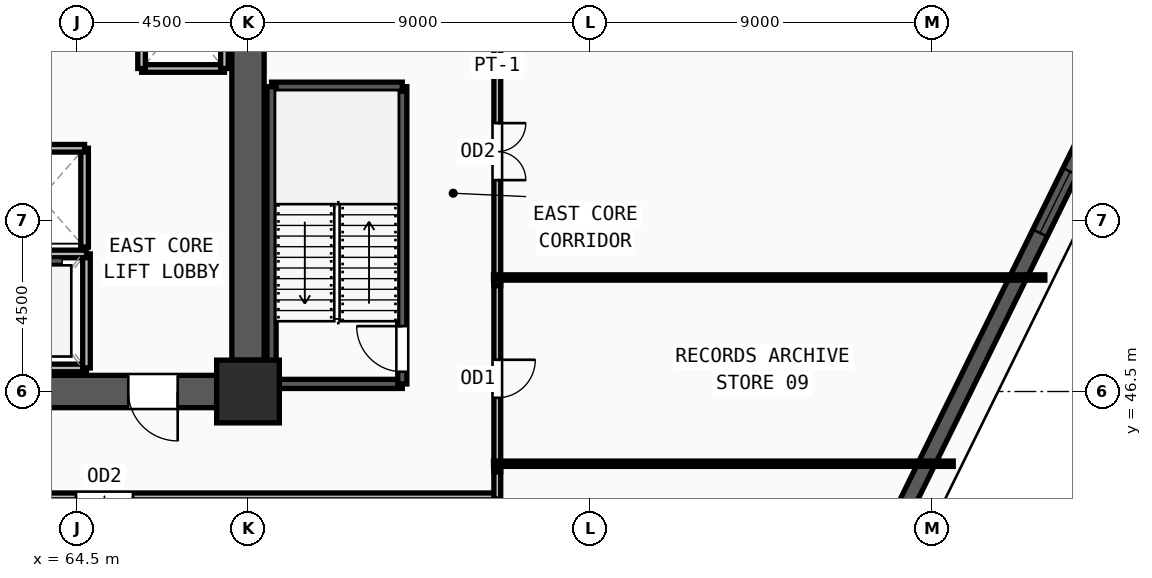
"""IFC4 building model, lengths in metres.
Left out: names, types, materials, properties, quantities, classifications, styles, units other than length and angle.
Written with IfcOpenShell. Run it as: python <this file> out.ifc"""

import sys

from ifc_helpers import new_model, si_unit, direction, frame, frame_2d, origin, origin_2d, place, context, subcontext, project, spatial, rectangle, extrude, source, transform, mapped, element, fill, save


model = new_model("IFC4")
c1 = context("Model", 3, precision=1e-05, world=origin(), true_north=direction((0.0, 1.0)))
c2 = subcontext(c1, "Body", "Model", "MODEL_VIEW")
j1 = project(units=[si_unit("LENGTHUNIT", "METRE"), si_unit("PLANEANGLEUNIT", "RADIAN")], contexts=[c1])
p1 = place(None, origin())
s1 = spatial("IfcSite", under=j1, at=p1, CompositionType="ELEMENT")
p2 = place(p1, origin())
s2 = spatial("IfcBuilding", under=s1, at=p2, CompositionType="ELEMENT")
p3 = place(p2, frame((0.0, 0.0, 39.75)))
s3 = spatial("IfcBuildingStorey", under=s2, at=p3, CompositionType="ELEMENT", Elevation=39.75)
m1 = source(origin(), c2, "Body", "SweptSolid", [
    extrude(rectangle(XDim=1.65, YDim=1.65, at=origin_2d()), origin(), (0.0, 0.0, 1.0), 3.75),
])
p4 = place(p3, frame((69.0, 46.5, 0.0), z_axis=(0.0, 0.0, 1.0), x_axis=(1.0, 0.0, 0.0)))
e1 = element("IfcColumn", 1, at=p4, inside=s3, PredefinedType="COLUMN", context=c2, shape_type="MappedRepresentation", body=[
    mapped(m1, transform((0.0, 0.0, 0.0), x_axis=(1.0, 0.0, 0.0), y_axis=(0.0, 1.0, 0.0), z_axis=(0.0, 0.0, 1.0), scale=1.0)),
])
p5 = place(p3, frame((86.172, 43.21, 0.0), z_axis=(0.0, 0.0, 1.0), x_axis=(0.441367208162, 0.897326577985, 0.0)))
e2 = element("IfcWall", 2, at=p5, inside=s3, PredefinedType="SOLIDWALL", context=c2, shape_type="SweptSolid", body=[
    extrude(rectangle(XDim=28.058, YDim=0.42, at=frame_2d((14.029, 0.0))), origin(), (0.0, 0.0, 1.0), 3.57),
])
m2 = source(origin(), c2, "Body", "SweptSolid", [
    extrude(rectangle(XDim=1.8, YDim=1.95, at=frame_2d((0.9, 0.975))), frame((0.0, 0.22, 0.0), z_axis=(0.0, -1.0, 0.0), x_axis=(1.0, 0.0, 0.0)), (0.0, 0.0, 1.0), 0.44),
])
p6 = place(p5, frame((8.314, 0.0, 0.55)))
e3 = element("IfcOpeningElement", 3, at=p6, cuts=e2, PredefinedType="OPENING", context=c2, shape_type="MappedRepresentation", body=[
    mapped(m2, transform((0.0, 0.0, 0.0), x_axis=(1.0, 0.0, 0.0), y_axis=(0.0, 1.0, 0.0), z_axis=(0.0, 0.0, 1.0), scale=1.0)),
])
p7 = place(p5, frame((13.129, 0.0, 0.55)))
e4 = element("IfcOpeningElement", 4, at=p7, cuts=e2, PredefinedType="OPENING", context=c2, shape_type="MappedRepresentation", body=[
    mapped(m2, transform((0.0, 0.0, 0.0), x_axis=(1.0, 0.0, 0.0), y_axis=(0.0, 1.0, 0.0), z_axis=(0.0, 0.0, 1.0), scale=1.0)),
])
p8 = place(p5, frame((20.143, 0.0, 0.55)))
e5 = element("IfcOpeningElement", 5, at=p8, cuts=e2, PredefinedType="OPENING", context=c2, shape_type="MappedRepresentation", body=[
    mapped(m2, transform((0.0, 0.0, 0.0), x_axis=(1.0, 0.0, 0.0), y_axis=(0.0, 1.0, 0.0), z_axis=(0.0, 0.0, 1.0), scale=1.0)),
])
p9 = place(p3, frame((69.0, 60.675, 0.0), z_axis=(0.0, 0.0, 1.0), x_axis=(0.0, -1.0, 0.0)))
e6 = element("IfcWall", 6, at=p9, inside=s3, PredefinedType="SHEAR", context=c2, shape_type="SweptSolid", body=[
    extrude(rectangle(XDim=13.35, YDim=0.85, at=frame_2d((6.675, 0.0))), origin(), (0.0, 0.0, 1.0), 3.57),
])
m3 = source(origin(), c2, "Body", "SweptSolid", [
    extrude(rectangle(XDim=1.2, YDim=2.2, at=frame_2d((0.6, 1.1))), frame((0.0, 0.435, 0.0), z_axis=(0.0, -1.0, 0.0), x_axis=(1.0, 0.0, 0.0)), (0.0, 0.0, 1.0), 0.87),
])
p10 = place(p9, frame((1.125, 0.0, 0.0)))
e7 = element("IfcOpeningElement", 7, at=p10, cuts=e6, PredefinedType="OPENING", context=c2, shape_type="MappedRepresentation", body=[
    mapped(m3, transform((0.0, 0.0, 0.0), x_axis=(1.0, 0.0, 0.0), y_axis=(0.0, 1.0, 0.0), z_axis=(0.0, 0.0, 1.0), scale=1.0)),
])
p11 = place(p3, frame((68.175, 46.5, 0.0), z_axis=(0.0, 0.0, 1.0), x_axis=(-1.0, 0.0, 0.0)))
e8 = element("IfcWall", 8, at=p11, inside=s3, PredefinedType="SHEAR", context=c2, shape_type="SweptSolid", body=[
    extrude(rectangle(XDim=7.35, YDim=0.85, at=frame_2d((3.675, 0.0))), origin(), (0.0, 0.0, 1.0), 3.57),
])
m4 = source(origin(), c2, "Body", "SweptSolid", [
    extrude(rectangle(XDim=1.3, YDim=2.2, at=frame_2d((0.65, 1.1))), frame((0.0, 0.435, 0.0), z_axis=(0.0, -1.0, 0.0), x_axis=(1.0, 0.0, 0.0)), (0.0, 0.0, 1.0), 0.87),
])
p12 = place(p11, frame((1.025, 0.0, 0.0)))
e9 = element("IfcOpeningElement", 9, at=p12, cuts=e8, PredefinedType="OPENING", context=c2, shape_type="MappedRepresentation", body=[
    mapped(m4, transform((0.0, 0.0, 0.0), x_axis=(1.0, 0.0, 0.0), y_axis=(0.0, 1.0, 0.0), z_axis=(0.0, 0.0, 1.0), scale=1.0)),
])
p13 = place(p3, frame((69.62, 46.7, 0.0), z_axis=(0.0, 0.0, 1.0), x_axis=(1.0, 0.0, 0.0)))
e10 = element("IfcWall", 10, at=p13, inside=s3, PredefinedType="SOLIDWALL", context=c2, shape_type="SweptSolid", body=[
    extrude(rectangle(XDim=3.44, YDim=0.24, at=frame_2d((1.72, 0.0))), origin(), (0.0, 0.0, 1.0), 3.57),
])
p14 = place(p3, frame((73.06, 46.7, 0.0), z_axis=(0.0, 0.0, 1.0), x_axis=(0.0, 1.0, 0.0)))
e11 = element("IfcWall", 11, at=p14, inside=s3, PredefinedType="SOLIDWALL", context=c2, shape_type="SweptSolid", body=[
    extrude(rectangle(XDim=7.82, YDim=0.24, at=frame_2d((3.91, 0.0))), origin(), (0.0, 0.0, 1.0), 3.57),
])
m5 = source(origin(), c2, "Body", "SweptSolid", [
    extrude(rectangle(XDim=1.2, YDim=2.2, at=frame_2d((0.6, 1.1))), frame((0.0, 0.13, 0.0), z_axis=(0.0, -1.0, 0.0), x_axis=(1.0, 0.0, 0.0)), (0.0, 0.0, 1.0), 0.26),
])
p15 = place(p14, frame((0.32, 0.0, 0.0)))
e12 = element("IfcOpeningElement", 12, at=p15, cuts=e11, PredefinedType="OPENING", context=c2, shape_type="MappedRepresentation", body=[
    mapped(m5, transform((0.0, 0.0, 0.0), x_axis=(1.0, 0.0, 0.0), y_axis=(0.0, 1.0, 0.0), z_axis=(0.0, 0.0, 1.0), scale=1.0)),
])
p16 = place(p3, frame((73.06, 54.52, 0.0), z_axis=(0.0, 0.0, 1.0), x_axis=(-1.0, 0.0, 0.0)))
e13 = element("IfcWall", 13, at=p16, inside=s3, PredefinedType="SOLIDWALL", context=c2, shape_type="SweptSolid", body=[
    extrude(rectangle(XDim=3.44, YDim=0.24, at=frame_2d((1.72, 0.0))), origin(), (0.0, 0.0, 1.0), 3.57),
])
p17 = place(p3, frame((69.62, 54.52, 0.0), z_axis=(0.0, 0.0, 1.0), x_axis=(0.0, -1.0, 0.0)))
e14 = element("IfcWall", 14, at=p17, inside=s3, PredefinedType="SOLIDWALL", context=c2, shape_type="SweptSolid", body=[
    extrude(rectangle(XDim=7.82, YDim=0.24, at=frame_2d((3.91, 0.0))), origin(), (0.0, 0.0, 1.0), 3.57),
])
p18 = place(p3, frame((62.35, 47.12, 0.0), z_axis=(0.0, 0.0, 1.0), x_axis=(1.0, 0.0, 0.0)))
e15 = element("IfcWall", 15, at=p18, inside=s3, PredefinedType="SOLIDWALL", context=c2, shape_type="SweptSolid", body=[
    extrude(rectangle(XDim=2.4, YDim=0.2, at=frame_2d((1.2, 0.0))), origin(), (0.0, 0.0, 1.0), 3.57),
])
p19 = place(p3, frame((64.75, 47.12, 0.0), z_axis=(0.0, 0.0, 1.0), x_axis=(0.0, 1.0, 0.0)))
e16 = element("IfcWall", 16, at=p19, inside=s3, PredefinedType="SOLIDWALL", context=c2, shape_type="SweptSolid", body=[
    extrude(rectangle(XDim=3.0, YDim=0.2, at=frame_2d((1.5, 0.0))), origin(), (0.0, 0.0, 1.0), 3.57),
])
p20 = place(p3, frame((64.75, 50.12, 0.0), z_axis=(0.0, 0.0, 1.0), x_axis=(-1.0, 0.0, 0.0)))
e17 = element("IfcWall", 17, at=p20, inside=s3, PredefinedType="SOLIDWALL", context=c2, shape_type="SweptSolid", body=[
    extrude(rectangle(XDim=2.4, YDim=0.2, at=frame_2d((1.2, 0.0))), origin(), (0.0, 0.0, 1.0), 3.57),
])
p21 = place(p3, frame((66.2, 55.0, 0.0), z_axis=(0.0, 0.0, 1.0), x_axis=(1.0, 0.0, 0.0)))
e18 = element("IfcWall", 18, at=p21, inside=s3, PredefinedType="SOLIDWALL", context=c2, shape_type="SweptSolid", body=[
    extrude(rectangle(XDim=2.18, YDim=0.2, at=frame_2d((1.09, 0.0))), origin(), (0.0, 0.0, 1.0), 3.57),
])
for number, where, z_axis, x_axis in (
    (19, (68.38, 55.0, 0.0), (0.0, 0.0, 1.0), (0.0, 1.0, 0.0)),
    (20, (66.2, 57.75, 0.0), (0.0, 0.0, 1.0), (0.0, -1.0, 0.0)),
):
    element("IfcWall", number, at=place(p3, frame(where, z_axis=z_axis, x_axis=x_axis)), inside=s3, PredefinedType="SOLIDWALL", context=c2, shape_type="SweptSolid", body=[
        extrude(rectangle(XDim=2.75, YDim=0.2, at=frame_2d((1.375, 0.0))), origin(), (0.0, 0.0, 1.0), 3.57),
    ])
p22 = place(p3, frame((64.7, 50.3, 0.0), z_axis=(0.0, 0.0, 1.0), x_axis=(0.0, 1.0, 0.0)))
e21 = element("IfcWall", 21, at=p22, inside=s3, PredefinedType="SOLIDWALL", context=c2, shape_type="SweptSolid", body=[
    extrude(rectangle(XDim=2.6, YDim=0.2, at=frame_2d((1.3, 0.0))), origin(), (0.0, 0.0, 1.0), 3.57),
])
p23 = place(p3, frame((64.7, 52.9, 0.0), z_axis=(0.0, 0.0, 1.0), x_axis=(-1.0, 0.0, 0.0)))
e22 = element("IfcWall", 22, at=p23, inside=s3, PredefinedType="SOLIDWALL", context=c2, shape_type="SweptSolid", body=[
    extrude(rectangle(XDim=2.3, YDim=0.2, at=frame_2d((1.15, 0.0))), origin(), (0.0, 0.0, 1.0), 3.57),
])
p24 = place(p3, frame((75.56, 56.34, 0.0), z_axis=(0.0, 0.0, 1.0), x_axis=(0.0, -1.0, 0.0)))
e23 = element("IfcWall", 23, at=p24, inside=s3, PredefinedType="PARTITIONING", context=c2, shape_type="SweptSolid", body=[
    extrude(rectangle(XDim=7.055, YDim=0.18, at=frame_2d((3.528, 0.0))), origin(), (0.0, 0.0, 1.0), 3.57),
])
m6 = source(origin(), c2, "Body", "SweptSolid", [
    extrude(rectangle(XDim=1.5, YDim=2.2, at=frame_2d((0.75, 1.1))), frame((0.0, 0.1, 0.0), z_axis=(0.0, -1.0, 0.0), x_axis=(1.0, 0.0, 0.0)), (0.0, 0.0, 1.0), 0.2),
])
p25 = place(p24, frame((2.778, 0.0, 0.0)))
e24 = element("IfcOpeningElement", 24, at=p25, cuts=e23, PredefinedType="OPENING", context=c2, shape_type="MappedRepresentation", body=[
    mapped(m6, transform((0.0, 0.0, 0.0), x_axis=(1.0, 0.0, 0.0), y_axis=(0.0, 1.0, 0.0), z_axis=(0.0, 0.0, 1.0), scale=1.0)),
])
p26 = place(p3, frame((75.63, 43.74, 0.0), z_axis=(0.0, 0.0, 1.0), x_axis=(-1.0, 0.0, 0.0)))
e25 = element("IfcWall", 25, at=p26, inside=s3, PredefinedType="PARTITIONING", context=c2, shape_type="SweptSolid", body=[
    extrude(rectangle(XDim=21.415, YDim=0.18, at=frame_2d((10.708, 0.0))), origin(), (0.0, 0.0, 1.0), 3.57),
])
p27 = place(p26, frame((9.657, 0.0, 0.0)))
e26 = element("IfcOpeningElement", 26, at=p27, cuts=e25, PredefinedType="OPENING", context=c2, shape_type="MappedRepresentation", body=[
    mapped(m6, transform((0.0, 0.0, 0.0), x_axis=(1.0, 0.0, 0.0), y_axis=(0.0, 1.0, 0.0), z_axis=(0.0, 0.0, 1.0), scale=1.0)),
])
p28 = place(p3, frame((75.56, 49.285, 0.0), z_axis=(0.0, 0.0, 1.0), x_axis=(0.0, -1.0, 0.0)))
e27 = element("IfcWall", 27, at=p28, inside=s3, PredefinedType="PARTITIONING", context=c2, shape_type="SweptSolid", body=[
    extrude(rectangle(XDim=4.9, YDim=0.18, at=frame_2d((2.45, 0.0))), origin(), (0.0, 0.0, 1.0), 3.57),
])
m7 = source(origin(), c2, "Body", "SweptSolid", [
    extrude(rectangle(XDim=1.0, YDim=2.2, at=frame_2d((0.5, 1.1))), frame((0.0, 0.1, 0.0), z_axis=(0.0, -1.0, 0.0), x_axis=(1.0, 0.0, 0.0)), (0.0, 0.0, 1.0), 0.2),
])
p29 = place(p28, frame((1.95, 0.0, 0.0)))
e28 = element("IfcOpeningElement", 28, at=p29, cuts=e27, PredefinedType="OPENING", context=c2, shape_type="MappedRepresentation", body=[
    mapped(m7, transform((0.0, 0.0, 0.0), x_axis=(1.0, 0.0, 0.0), y_axis=(0.0, 1.0, 0.0), z_axis=(0.0, 0.0, 1.0), scale=1.0)),
])
p30 = place(p3, frame((75.56, 44.385, 0.0), z_axis=(0.0, 0.0, 1.0), x_axis=(0.0, -1.0, 0.0)))
e29 = element("IfcWall", 29, at=p30, inside=s3, PredefinedType="PARTITIONING", context=c2, shape_type="SweptSolid", body=[
    extrude(rectangle(XDim=0.715, YDim=0.18, at=frame_2d((0.357, 0.0))), origin(), (0.0, 0.0, 1.0), 3.57),
])
p31 = place(p3, frame((75.46, 44.6, 0.0), z_axis=(0.0, 0.0, 1.0), x_axis=(1.0, 0.0, 0.0)))
e30 = element("IfcWall", 30, at=p31, inside=s3, PredefinedType="PARTITIONING", context=c2, shape_type="SweptSolid", body=[
    extrude(rectangle(XDim=12.098, YDim=0.14, at=frame_2d((6.049, 0.0))), origin(), (0.0, 0.0, 1.0), 2.705),
])
p32 = place(p3, frame((75.46, 49.5, 0.0), z_axis=(0.0, 0.0, 1.0), x_axis=(1.0, 0.0, 0.0)))
e31 = element("IfcWall", 31, at=p32, inside=s3, PredefinedType="PARTITIONING", context=c2, shape_type="SweptSolid", body=[
    extrude(rectangle(XDim=14.508, YDim=0.14, at=frame_2d((7.254, 0.0))), origin(), (0.0, 0.0, 1.0), 3.57),
])
m8 = source(origin(), c2, "Body", "SweptSolid", [
    extrude(rectangle(XDim=1.8, YDim=1.95, at=frame_2d((0.9, 0.975))), frame((0.0, 0.03, 0.0), z_axis=(0.0, -1.0, 0.0), x_axis=(1.0, 0.0, 0.0)), (0.0, 0.0, 1.0), 0.06),
])
p33 = place(p6, origin())
e32 = element("IfcWindow", 32, at=p33, inside=s3, PartitioningType="DOUBLE_PANEL_VERTICAL", PredefinedType="WINDOW", context=c2, shape_type="MappedRepresentation", body=[
    mapped(m8, transform((0.0, 0.0, 0.0), x_axis=(1.0, 0.0, 0.0), y_axis=(0.0, 1.0, 0.0), z_axis=(0.0, 0.0, 1.0), scale=1.0)),
])
fill(e3, e32)
m9 = source(origin(), c2, "Body", "SweptSolid", [
    extrude(rectangle(XDim=1.3, YDim=2.2, at=frame_2d((0.65, 1.1))), frame((0.0, 0.025, 0.0), z_axis=(0.0, -1.0, 0.0), x_axis=(1.0, 0.0, 0.0)), (0.0, 0.0, 1.0), 0.05),
])
p34 = place(p12, origin())
e33 = element("IfcDoor", 33, at=p34, inside=s3, OperationType="SINGLE_SWING_LEFT", PredefinedType="DOOR", context=c2, shape_type="MappedRepresentation", body=[
    mapped(m9, transform((0.0, 0.0, 0.0), x_axis=(1.0, 0.0, 0.0), y_axis=(0.0, 1.0, 0.0), z_axis=(0.0, 0.0, 1.0), scale=1.0)),
])
fill(e9, e33)
m10 = source(origin(), c2, "Body", "SweptSolid", [
    extrude(rectangle(XDim=1.2, YDim=2.2, at=frame_2d((0.6, 1.1))), frame((0.0, 0.025, 0.0), z_axis=(0.0, -1.0, 0.0), x_axis=(1.0, 0.0, 0.0)), (0.0, 0.0, 1.0), 0.05),
])
p35 = place(p15, origin())
e34 = element("IfcDoor", 34, at=p35, inside=s3, OperationType="SINGLE_SWING_RIGHT", PredefinedType="DOOR", context=c2, shape_type="MappedRepresentation", body=[
    mapped(m10, transform((0.0, 0.0, 0.0), x_axis=(1.0, 0.0, 0.0), y_axis=(0.0, 1.0, 0.0), z_axis=(0.0, 0.0, 1.0), scale=1.0)),
])
fill(e12, e34)
m11 = source(origin(), c2, "Body", "SweptSolid", [
    extrude(rectangle(XDim=1.5, YDim=2.2, at=frame_2d((0.75, 1.1))), frame((0.0, 0.025, 0.0), z_axis=(0.0, -1.0, 0.0), x_axis=(1.0, 0.0, 0.0)), (0.0, 0.0, 1.0), 0.05),
])
p36 = place(p25, origin())
e35 = element("IfcDoor", 35, at=p36, inside=s3, OperationType="DOUBLE_DOOR_SINGLE_SWING", PredefinedType="DOOR", context=c2, shape_type="MappedRepresentation", body=[
    mapped(m11, transform((0.0, 0.0, 0.0), x_axis=(1.0, 0.0, 0.0), y_axis=(0.0, 1.0, 0.0), z_axis=(0.0, 0.0, 1.0), scale=1.0)),
])
fill(e24, e35)
p37 = place(p27, origin())
e36 = element("IfcDoor", 36, at=p37, inside=s3, OperationType="DOUBLE_DOOR_SINGLE_SWING", PredefinedType="DOOR", context=c2, shape_type="MappedRepresentation", body=[
    mapped(m11, transform((0.0, 0.0, 0.0), x_axis=(1.0, 0.0, 0.0), y_axis=(0.0, 1.0, 0.0), z_axis=(0.0, 0.0, 1.0), scale=1.0)),
])
fill(e26, e36)
m12 = source(origin(), c2, "Body", "SweptSolid", [
    extrude(rectangle(XDim=1.0, YDim=2.2, at=frame_2d((0.5, 1.1))), frame((0.0, 0.025, 0.0), z_axis=(0.0, -1.0, 0.0), x_axis=(1.0, 0.0, 0.0)), (0.0, 0.0, 1.0), 0.05),
])
p38 = place(p29, origin())
e37 = element("IfcDoor", 37, at=p38, inside=s3, OperationType="SINGLE_SWING_LEFT", PredefinedType="DOOR", context=c2, shape_type="MappedRepresentation", body=[
    mapped(m12, transform((0.0, 0.0, 0.0), x_axis=(1.0, 0.0, 0.0), y_axis=(0.0, 1.0, 0.0), z_axis=(0.0, 0.0, 1.0), scale=1.0)),
])
fill(e28, e37)
save(model, sys.argv[1])
